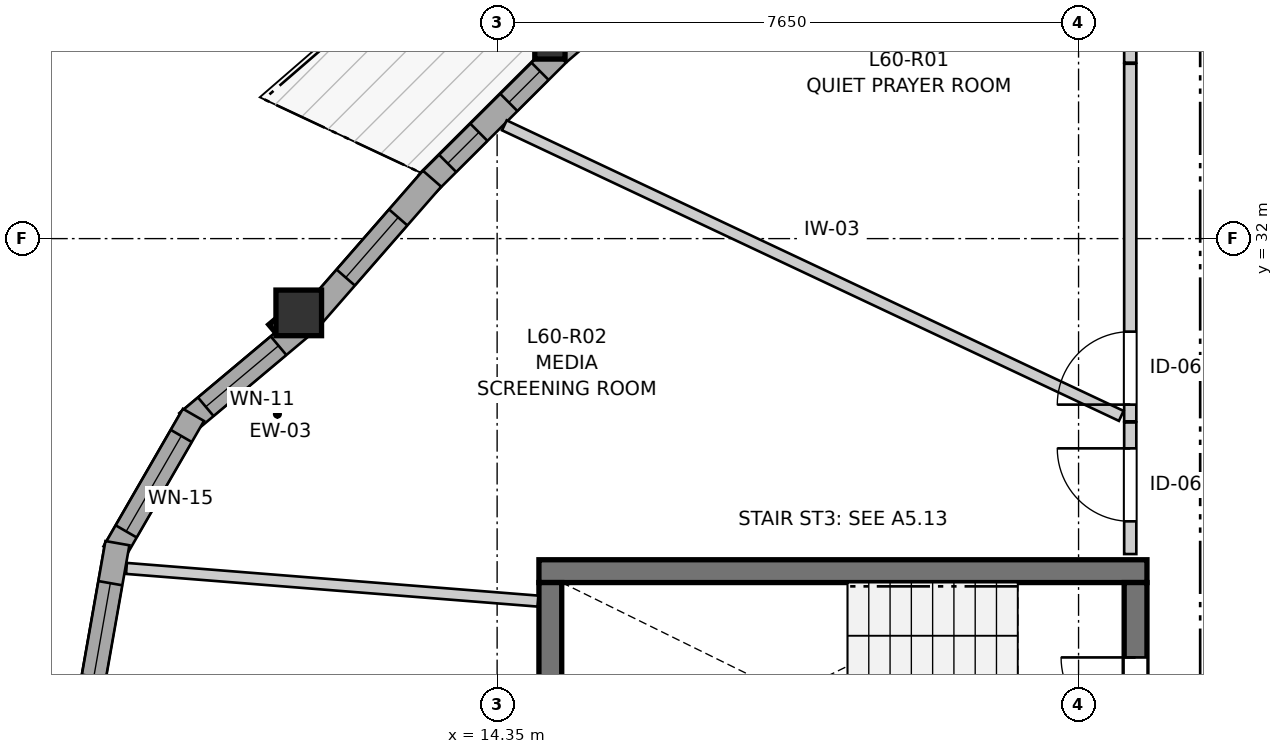
"""IFC4 building model, lengths in metres.
Left out: names, types, materials, properties, quantities, classifications, styles, units other than length and angle.
Written with IfcOpenShell. Run it as: python <this file> out.ifc"""

import sys

from ifc_helpers import new_model, si_unit, direction, frame, frame_2d, origin, origin_2d, place, context, subcontext, project, spatial, rectangle, i_section, extrude, source, transform, mapped, element, fill, save


model = new_model("IFC4")
c1 = context("Model", 3, precision=1e-05, world=origin(), true_north=direction((0.0, 1.0)))
c2 = subcontext(c1, "Body", "Model", "MODEL_VIEW")
j1 = project(units=[si_unit("LENGTHUNIT", "METRE"), si_unit("PLANEANGLEUNIT", "RADIAN")], contexts=[c1])
p1 = place(None, origin())
s1 = spatial("IfcSite", under=j1, at=p1, CompositionType="ELEMENT")
p2 = place(p1, origin())
s2 = spatial("IfcBuilding", under=s1, at=p2, CompositionType="ELEMENT")
p3 = place(p2, frame((0.0, 0.0, 202.0)))
s3 = spatial("IfcBuildingStorey", under=s2, at=p3, CompositionType="ELEMENT", Elevation=202.0)
p4 = place(p3, frame((22.9, 27.625, 0.0), z_axis=(0.0, 0.0, 1.0), x_axis=(-1.0, 0.0, 0.0)))
e1 = element("IfcWall", 1, at=p4, inside=s3, PredefinedType="SHEAR", context=c2, shape_type="SweptSolid", body=[
    extrude(rectangle(XDim=8.0, YDim=0.3, at=frame_2d((4.0, 0.0))), origin(), (0.0, 0.0, 1.0), 2.935),
])
p5 = place(p3, frame((15.05, 27.475, 0.0), z_axis=(0.0, 0.0, 1.0), x_axis=(0.0, -1.0, 0.0)))
e2 = element("IfcWall", 2, at=p5, inside=s3, PredefinedType="SHEAR", context=c2, shape_type="SweptSolid", body=[
    extrude(rectangle(XDim=2.95, YDim=0.3, at=frame_2d((1.475, 0.0))), origin(), (0.0, 0.0, 1.0), 2.935),
])
p6 = place(p3, frame((22.75, 24.525, 0.0), z_axis=(0.0, 0.0, 1.0), x_axis=(0.0, 1.0, 0.0)))
e3 = element("IfcWall", 3, at=p6, inside=s3, PredefinedType="SHEAR", context=c2, shape_type="SweptSolid", body=[
    extrude(rectangle(XDim=2.95, YDim=0.3, at=frame_2d((1.475, 0.0))), origin(), (0.0, 0.0, 1.0), 2.935),
])
p7 = place(p6, frame((0.985, 0.0, 0.0)))
e4 = element("IfcOpeningElement", 4, at=p7, cuts=e3, PredefinedType="OPENING", context=c2, shape_type="SweptSolid", body=[
    extrude(rectangle(XDim=0.98, YDim=2.15, at=frame_2d((0.49, 1.075))), frame((0.0, 0.16, 0.0), z_axis=(0.0, -1.0, 0.0), x_axis=(1.0, 0.0, 0.0)), (0.0, 0.0, 1.0), 0.32),
])
m1 = source(origin(), c2, "Body", "SweptSolid", [
    extrude(rectangle(XDim=0.6, YDim=0.6, at=origin_2d()), origin(), (0.0, 0.0, 1.0), 2.935),
])
p8 = place(p3, frame((11.74, 31.023, 0.0), z_axis=(0.0, 0.0, 1.0), x_axis=(1.0, 0.0, 0.0)))
e5 = element("IfcColumn", 5, at=p8, inside=s3, PredefinedType="COLUMN", context=c2, shape_type="MappedRepresentation", body=[
    mapped(m1, transform((0.0, 0.0, 0.0), x_axis=(1.0, 0.0, 0.0), y_axis=(0.0, 1.0, 0.0), z_axis=(0.0, 0.0, 1.0), scale=1.0)),
])
m2 = source(origin(), c2, "Body", "SweptSolid", [
    extrude(i_section(OverallWidth=0.398, OverallDepth=0.387, WebThickness=0.019, FlangeThickness=0.03, FilletRadius=0.015, at=origin_2d()), origin(), (0.0, 0.0, 1.0), 2.935),
])
p9 = place(p3, frame((15.044, 34.555, 0.0), z_axis=(0.0, 0.0, 1.0), x_axis=(1.0, 0.0, 0.0)))
e6 = element("IfcColumn", 6, at=p9, inside=s3, PredefinedType="PILASTER", context=c2, shape_type="MappedRepresentation", body=[
    mapped(m2, transform((0.0, 0.0, 0.0), x_axis=(1.0, 0.0, 0.0), y_axis=(0.0, 1.0, 0.0), z_axis=(0.0, 0.0, 1.0), scale=1.0)),
])
p10 = place(p3, frame((11.774, 30.843, 0.0), z_axis=(0.0, 0.0, 1.0), x_axis=(-0.766116451135, -0.642701784112, 0.0)))
e7 = element("IfcWall", 7, at=p10, inside=s3, PredefinedType="SOLIDWALL", context=c2, shape_type="SweptSolid", body=[
    extrude(rectangle(XDim=1.962, YDim=0.32, at=frame_2d((0.981, 0.0))), origin(), (0.0, 0.0, 1.0), 2.555),
])
p11 = place(p10, frame((0.391, 0.0, 0.82)))
e8 = element("IfcOpeningElement", 8, at=p11, cuts=e7, PredefinedType="OPENING", context=c2, shape_type="SweptSolid", body=[
    extrude(rectangle(XDim=1.25, YDim=1.35, at=frame_2d((0.625, 0.675))), frame((0.0, 0.17, 0.0), z_axis=(0.0, -1.0, 0.0), x_axis=(1.0, 0.0, 0.0)), (0.0, 0.0, 1.0), 0.34),
])
p12 = place(p3, frame((10.354, 29.681, 0.0), z_axis=(0.0, 0.0, 1.0), x_axis=(-0.499995423472, -0.866028046028, 0.0)))
e9 = element("IfcWall", 9, at=p12, inside=s3, PredefinedType="SOLIDWALL", context=c2, shape_type="SweptSolid", body=[
    extrude(rectangle(XDim=2.09, YDim=0.32, at=frame_2d((1.045, 0.0))), origin(), (0.0, 0.0, 1.0), 2.555),
])
p13 = place(p12, frame((0.32, 0.0, 0.82)))
e10 = element("IfcOpeningElement", 10, at=p13, cuts=e9, PredefinedType="OPENING", context=c2, shape_type="SweptSolid", body=[
    extrude(rectangle(XDim=1.45, YDim=1.25, at=frame_2d((0.725, 0.625))), frame((0.0, 0.17, 0.0), z_axis=(0.0, -1.0, 0.0), x_axis=(1.0, 0.0, 0.0)), (0.0, 0.0, 1.0), 0.34),
])
p14 = place(p3, frame((9.354, 27.993, 0.0), z_axis=(0.0, 0.0, 1.0), x_axis=(-0.173672066494, -0.984803540469, 0.0)))
e11 = element("IfcWall", 11, at=p14, inside=s3, PredefinedType="SOLIDWALL", context=c2, shape_type="SweptSolid", body=[
    extrude(rectangle(XDim=2.09, YDim=0.32, at=frame_2d((1.045, 0.0))), origin(), (0.0, 0.0, 1.0), 2.555),
])
p15 = place(p14, frame((0.535, 0.0, 0.82)))
e12 = element("IfcOpeningElement", 12, at=p15, cuts=e11, PredefinedType="OPENING", context=c2, shape_type="SweptSolid", body=[
    extrude(rectangle(XDim=1.25, YDim=1.35, at=frame_2d((0.625, 0.675))), frame((0.0, 0.17, 0.0), z_axis=(0.0, -1.0, 0.0), x_axis=(1.0, 0.0, 0.0)), (0.0, 0.0, 1.0), 0.34),
])
p16 = place(p3, frame((16.962, 35.997, 0.0), z_axis=(0.0, 0.0, 1.0), x_axis=(-0.757474860475, -0.652864331808, 0.0)))
e13 = element("IfcWall", 13, at=p16, inside=s3, PredefinedType="SOLIDWALL", context=c2, shape_type="SweptSolid", body=[
    extrude(rectangle(XDim=2.374, YDim=0.32, at=frame_2d((1.187, 0.0))), origin(), (0.0, 0.0, 1.0), 2.555),
])
p17 = place(p16, frame((0.522, 0.0, 0.82)))
e14 = element("IfcOpeningElement", 14, at=p17, cuts=e13, PredefinedType="OPENING", context=c2, shape_type="SweptSolid", body=[
    extrude(rectangle(XDim=1.35, YDim=1.45, at=frame_2d((0.675, 0.725))), frame((0.0, 0.17, 0.0), z_axis=(0.0, -1.0, 0.0), x_axis=(1.0, 0.0, 0.0)), (0.0, 0.0, 1.0), 0.34),
])
p18 = place(p3, frame((15.143, 34.428, 0.0), z_axis=(0.0, 0.0, 1.0), x_axis=(-0.708370597245, -0.705840702255, 0.0)))
e15 = element("IfcWall", 15, at=p18, inside=s3, PredefinedType="SOLIDWALL", context=c2, shape_type="SweptSolid", body=[
    extrude(rectangle(XDim=2.413, YDim=0.32, at=frame_2d((1.206, 0.0))), origin(), (0.0, 0.0, 1.0), 2.555),
])
p19 = place(p18, frame((0.322, 0.0, 0.82)))
e16 = element("IfcOpeningElement", 16, at=p19, cuts=e15, PredefinedType="OPENING", context=c2, shape_type="SweptSolid", body=[
    extrude(rectangle(XDim=0.58, YDim=1.35, at=frame_2d((0.29, 0.675))), frame((0.0, 0.17, 0.0), z_axis=(0.0, -1.0, 0.0), x_axis=(1.0, 0.0, 0.0)), (0.0, 0.0, 1.0), 0.34),
])
p20 = place(p18, frame((1.458, 0.0, 0.82)))
e17 = element("IfcOpeningElement", 17, at=p20, cuts=e15, PredefinedType="OPENING", context=c2, shape_type="SweptSolid", body=[
    extrude(rectangle(XDim=0.58, YDim=1.35, at=frame_2d((0.29, 0.675))), frame((0.0, 0.17, 0.0), z_axis=(0.0, -1.0, 0.0), x_axis=(1.0, 0.0, 0.0)), (0.0, 0.0, 1.0), 0.34),
])
p21 = place(p3, frame((13.494, 32.789, 0.0), z_axis=(0.0, 0.0, 1.0), x_axis=(-0.65765213646, -0.753321755566, 0.0)))
e18 = element("IfcWall", 18, at=p21, inside=s3, PredefinedType="SOLIDWALL", context=c2, shape_type="SweptSolid", body=[
    extrude(rectangle(XDim=2.394, YDim=0.32, at=frame_2d((1.197, 0.0))), origin(), (0.0, 0.0, 1.0), 2.555),
])
p22 = place(p21, frame((0.677, 0.0, 0.82)))
e19 = element("IfcOpeningElement", 19, at=p22, cuts=e18, PredefinedType="OPENING", context=c2, shape_type="SweptSolid", body=[
    extrude(rectangle(XDim=1.05, YDim=1.45, at=frame_2d((0.525, 0.725))), frame((0.0, 0.17, 0.0), z_axis=(0.0, -1.0, 0.0), x_axis=(1.0, 0.0, 0.0)), (0.0, 0.0, 1.0), 0.34),
])
p23 = place(p3, frame((22.68, 29.596, 0.0), z_axis=(0.0, 0.0, 1.0), x_axis=(0.0, 1.0, 0.0)))
e20 = element("IfcWall", 20, at=p23, inside=s3, PredefinedType="PARTITIONING", context=c2, shape_type="SweptSolid", body=[
    extrude(rectangle(XDim=4.704, YDim=0.16, at=frame_2d((2.352, 0.0))), origin(), (0.0, 0.0, 1.0), 2.935),
])
p24 = place(p23, frame((0.22, 0.0, 0.0)))
e21 = element("IfcOpeningElement", 21, at=p24, cuts=e20, PredefinedType="OPENING", context=c2, shape_type="SweptSolid", body=[
    extrude(rectangle(XDim=0.96, YDim=2.1, at=frame_2d((0.48, 1.05))), frame((0.0, 0.09, 0.0), z_axis=(0.0, -1.0, 0.0), x_axis=(1.0, 0.0, 0.0)), (0.0, 0.0, 1.0), 0.18),
])
p25 = place(p3, frame((22.68, 27.85, 0.0), z_axis=(0.0, 0.0, 1.0), x_axis=(0.0, 1.0, 0.0)))
e22 = element("IfcWall", 22, at=p25, inside=s3, PredefinedType="PARTITIONING", context=c2, shape_type="SweptSolid", body=[
    extrude(rectangle(XDim=1.731, YDim=0.16, at=frame_2d((0.865, 0.0))), origin(), (0.0, 0.0, 1.0), 2.935),
])
p26 = place(p25, frame((0.43, 0.0, 0.0)))
e23 = element("IfcOpeningElement", 23, at=p26, cuts=e22, PredefinedType="OPENING", context=c2, shape_type="SweptSolid", body=[
    extrude(rectangle(XDim=0.96, YDim=2.1, at=frame_2d((0.48, 1.05))), frame((0.0, 0.09, 0.0), z_axis=(0.0, -1.0, 0.0), x_axis=(1.0, 0.0, 0.0)), (0.0, 0.0, 1.0), 0.18),
])
p27 = place(p3, frame((14.445, 33.49, 0.0), z_axis=(0.0, 0.0, 1.0), x_axis=(0.904673727325, -0.426104971912, 0.0)))
e24 = element("IfcWall", 24, at=p27, inside=s3, PredefinedType="PARTITIONING", context=c2, shape_type="SweptSolid", body=[
    extrude(rectangle(XDim=8.972, YDim=0.145, at=frame_2d((4.486, 0.0))), origin(), (0.0, 0.0, 1.0), 2.935),
])
p28 = place(p3, frame((9.473, 27.661, 0.0), z_axis=(0.0, 0.0, 1.0), x_axis=(0.996864548282, -0.079126938392, 0.0)))
e25 = element("IfcWall", 25, at=p28, inside=s3, PredefinedType="PARTITIONING", context=c2, shape_type="SweptSolid", body=[
    extrude(rectangle(XDim=5.43, YDim=0.145, at=frame_2d((2.715, 0.0))), origin(), (0.0, 0.0, 1.0), 2.935),
])
p29 = place(p3, frame((22.68, 34.315, 0.0), z_axis=(0.0, 0.0, 1.0), x_axis=(0.0, 1.0, 0.0)))
e26 = element("IfcWall", 26, at=p29, inside=s3, PredefinedType="PARTITIONING", context=c2, shape_type="SweptSolid", body=[
    extrude(rectangle(XDim=1.605, YDim=0.16, at=frame_2d((0.802, 0.0))), origin(), (0.0, 0.0, 1.0), 2.935),
])
m3 = source(origin(), c2, "Body", "SweptSolid", [
    extrude(rectangle(XDim=1.25, YDim=1.35, at=frame_2d((0.625, 0.675))), frame((0.0, 0.03, 0.0), z_axis=(0.0, -1.0, 0.0), x_axis=(1.0, 0.0, 0.0)), (0.0, 0.0, 1.0), 0.06),
])
p30 = place(p11, origin())
e27 = element("IfcWindow", 27, at=p30, inside=s3, PartitioningType="SINGLE_PANEL", PredefinedType="WINDOW", context=c2, shape_type="MappedRepresentation", body=[
    mapped(m3, transform((0.0, 0.0, 0.0), x_axis=(1.0, 0.0, 0.0), y_axis=(0.0, 1.0, 0.0), z_axis=(0.0, 0.0, 1.0), scale=1.0)),
])
fill(e8, e27)
m4 = source(origin(), c2, "Body", "SweptSolid", [
    extrude(rectangle(XDim=1.45, YDim=1.25, at=frame_2d((0.725, 0.625))), frame((0.0, 0.03, 0.0), z_axis=(0.0, -1.0, 0.0), x_axis=(1.0, 0.0, 0.0)), (0.0, 0.0, 1.0), 0.06),
])
p31 = place(p13, origin())
e28 = element("IfcWindow", 28, at=p31, inside=s3, PartitioningType="SINGLE_PANEL", PredefinedType="WINDOW", context=c2, shape_type="MappedRepresentation", body=[
    mapped(m4, transform((0.0, 0.0, 0.0), x_axis=(1.0, 0.0, 0.0), y_axis=(0.0, 1.0, 0.0), z_axis=(0.0, 0.0, 1.0), scale=1.0)),
])
fill(e10, e28)
p32 = place(p15, origin())
e29 = element("IfcWindow", 29, at=p32, inside=s3, PartitioningType="SINGLE_PANEL", PredefinedType="WINDOW", context=c2, shape_type="MappedRepresentation", body=[
    mapped(m3, transform((0.0, 0.0, 0.0), x_axis=(1.0, 0.0, 0.0), y_axis=(0.0, 1.0, 0.0), z_axis=(0.0, 0.0, 1.0), scale=1.0)),
])
fill(e12, e29)
m5 = source(origin(), c2, "Body", "SweptSolid", [
    extrude(rectangle(XDim=0.58, YDim=1.35, at=frame_2d((0.29, 0.675))), frame((0.0, 0.03, 0.0), z_axis=(0.0, -1.0, 0.0), x_axis=(1.0, 0.0, 0.0)), (0.0, 0.0, 1.0), 0.06),
])
p33 = place(p19, origin())
e30 = element("IfcWindow", 30, at=p33, inside=s3, PartitioningType="SINGLE_PANEL", PredefinedType="WINDOW", context=c2, shape_type="MappedRepresentation", body=[
    mapped(m5, transform((0.0, 0.0, 0.0), x_axis=(1.0, 0.0, 0.0), y_axis=(0.0, 1.0, 0.0), z_axis=(0.0, 0.0, 1.0), scale=1.0)),
])
fill(e16, e30)
p34 = place(p20, origin())
e31 = element("IfcWindow", 31, at=p34, inside=s3, PartitioningType="SINGLE_PANEL", PredefinedType="WINDOW", context=c2, shape_type="MappedRepresentation", body=[
    mapped(m5, transform((0.0, 0.0, 0.0), x_axis=(1.0, 0.0, 0.0), y_axis=(0.0, 1.0, 0.0), z_axis=(0.0, 0.0, 1.0), scale=1.0)),
])
fill(e17, e31)
m6 = source(origin(), c2, "Body", "SweptSolid", [
    extrude(rectangle(XDim=1.05, YDim=1.45, at=frame_2d((0.525, 0.725))), frame((0.0, 0.03, 0.0), z_axis=(0.0, -1.0, 0.0), x_axis=(1.0, 0.0, 0.0)), (0.0, 0.0, 1.0), 0.06),
])
p35 = place(p22, origin())
e32 = element("IfcWindow", 32, at=p35, inside=s3, PartitioningType="SINGLE_PANEL", PredefinedType="WINDOW", context=c2, shape_type="MappedRepresentation", body=[
    mapped(m6, transform((0.0, 0.0, 0.0), x_axis=(1.0, 0.0, 0.0), y_axis=(0.0, 1.0, 0.0), z_axis=(0.0, 0.0, 1.0), scale=1.0)),
])
fill(e19, e32)
m7 = source(origin(), c2, "Body", "SweptSolid", [
    extrude(rectangle(XDim=0.98, YDim=2.15, at=frame_2d((0.49, 1.075))), frame((0.0, 0.025, 0.0), z_axis=(0.0, -1.0, 0.0), x_axis=(1.0, 0.0, 0.0)), (0.0, 0.0, 1.0), 0.05),
])
p36 = place(p7, origin())
e33 = element("IfcDoor", 33, at=p36, inside=s3, OperationType="SINGLE_SWING_RIGHT", PredefinedType="DOOR", context=c2, shape_type="MappedRepresentation", body=[
    mapped(m7, transform((0.0, 0.0, 0.0), x_axis=(1.0, 0.0, 0.0), y_axis=(0.0, 1.0, 0.0), z_axis=(0.0, 0.0, 1.0), scale=1.0)),
])
fill(e4, e33)
m8 = source(origin(), c2, "Body", "SweptSolid", [
    extrude(rectangle(XDim=0.96, YDim=2.1, at=frame_2d((0.48, 1.05))), frame((0.0, 0.025, 0.0), z_axis=(0.0, -1.0, 0.0), x_axis=(1.0, 0.0, 0.0)), (0.0, 0.0, 1.0), 0.05),
])
p37 = place(p24, origin())
e34 = element("IfcDoor", 34, at=p37, inside=s3, OperationType="SINGLE_SWING_LEFT", PredefinedType="DOOR", context=c2, shape_type="MappedRepresentation", body=[
    mapped(m8, transform((0.0, 0.0, 0.0), x_axis=(1.0, 0.0, 0.0), y_axis=(0.0, 1.0, 0.0), z_axis=(0.0, 0.0, 1.0), scale=1.0)),
])
fill(e21, e34)
p38 = place(p26, origin())
e35 = element("IfcDoor", 35, at=p38, inside=s3, OperationType="SINGLE_SWING_RIGHT", PredefinedType="DOOR", context=c2, shape_type="MappedRepresentation", body=[
    mapped(m8, transform((0.0, 0.0, 0.0), x_axis=(1.0, 0.0, 0.0), y_axis=(0.0, 1.0, 0.0), z_axis=(0.0, 0.0, 1.0), scale=1.0)),
])
fill(e23, e35)
save(model, sys.argv[1])
